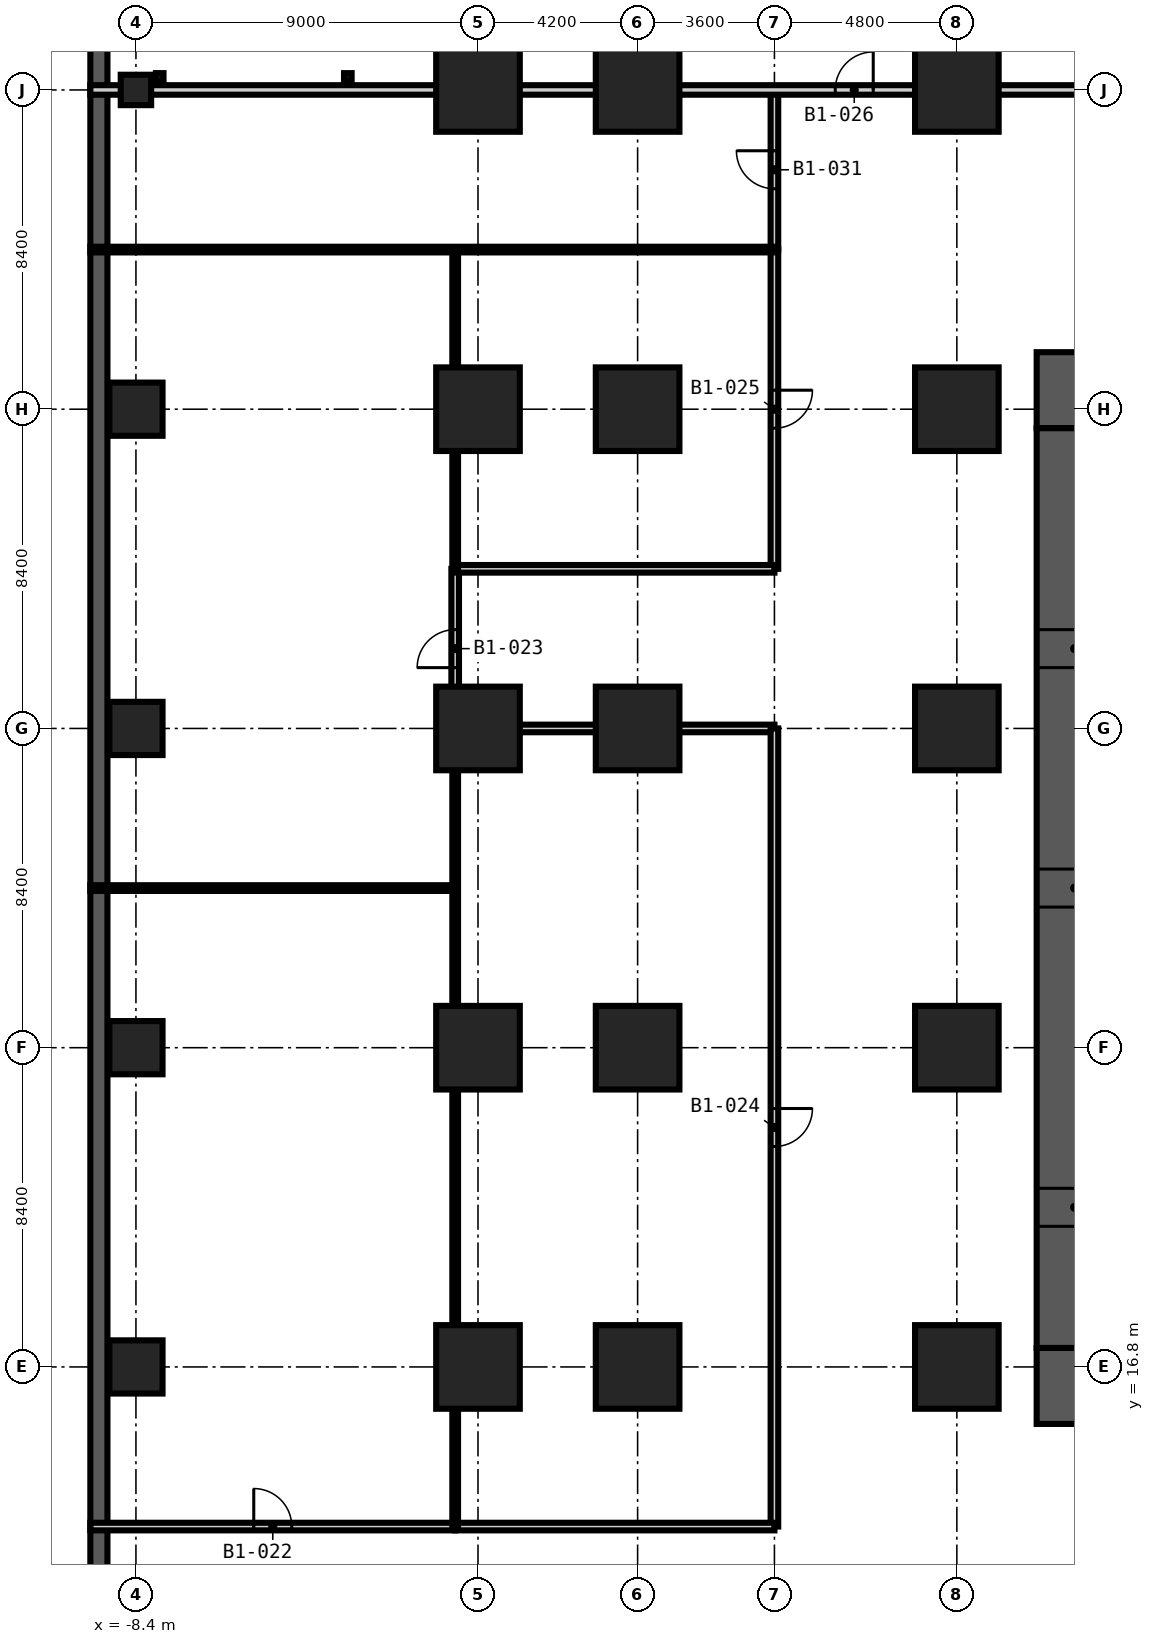
"""IFC4 building model, lengths in metres.
Left out: names, types, materials, properties, quantities, classifications, styles, units other than length and angle.
Written with IfcOpenShell. Run it as: python <this file> out.ifc"""

import sys

from ifc_helpers import new_model, si_unit, direction, frame, frame_2d, origin, origin_2d, place, context, subcontext, project, spatial, rectangle, hollow_rectangle, extrude, element, fill, save


model = new_model("IFC4")
c1 = context("Model", 3, precision=1e-05, world=origin(), true_north=direction((0.0, 1.0)))
c2 = subcontext(c1, "Body", "Model", "MODEL_VIEW")
j1 = project(units=[si_unit("LENGTHUNIT", "METRE"), si_unit("PLANEANGLEUNIT", "RADIAN")], contexts=[c1])
p1 = place(None, origin())
s1 = spatial("IfcSite", under=j1, at=p1, CompositionType="ELEMENT")
p2 = place(p1, origin())
s2 = spatial("IfcBuilding", under=s1, at=p2, CompositionType="ELEMENT")
p3 = place(p2, frame((0.0, 0.0, -5.4)))
s3 = spatial("IfcBuildingStorey", under=s2, at=p3, CompositionType="ELEMENT", Elevation=-5.4)
for number, where, z_axis, x_axis in (
    (1, (0.6, 16.8, 0.0), (0.0, 0.0, 1.0), (1.0, 0.0, 0.0)),
    (2, (0.6, 25.2, 0.0), (0.0, 0.0, 1.0), (1.0, 0.0, 0.0)),
    (3, (0.6, 33.6, 0.0), (0.0, 0.0, 1.0), (1.0, 0.0, 0.0)),
    (4, (0.6, 42.0, 0.0), (0.0, 0.0, 1.0), (1.0, 0.0, 0.0)),
    (5, (0.6, 50.4, 0.0), (0.0, 0.0, 1.0), (1.0, 0.0, 0.0)),
    (6, (4.8, 16.8, 0.0), (0.0, 0.0, 1.0), (1.0, 0.0, 0.0)),
    (7, (4.8, 25.2, 0.0), (0.0, 0.0, 1.0), (1.0, 0.0, 0.0)),
    (8, (4.8, 33.6, 0.0), (0.0, 0.0, 1.0), (1.0, 0.0, 0.0)),
    (9, (4.8, 42.0, 0.0), (0.0, 0.0, 1.0), (1.0, 0.0, 0.0)),
    (10, (4.8, 50.4, 0.0), (0.0, 0.0, 1.0), (1.0, 0.0, 0.0)),
    (11, (13.2, 16.8, 0.0), (0.0, 0.0, 1.0), (1.0, 0.0, 0.0)),
    (12, (13.2, 25.2, 0.0), (0.0, 0.0, 1.0), (1.0, 0.0, 0.0)),
    (13, (13.2, 33.6, 0.0), (0.0, 0.0, 1.0), (1.0, 0.0, 0.0)),
    (14, (13.2, 42.0, 0.0), (0.0, 0.0, 1.0), (1.0, 0.0, 0.0)),
    (15, (13.2, 50.4, 0.0), (0.0, 0.0, 1.0), (1.0, 0.0, 0.0)),
):
    element("IfcColumn", number, at=place(p3, frame(where, z_axis=z_axis, x_axis=x_axis)), inside=s3, PredefinedType="COLUMN", context=c2, shape_type="SweptSolid", body=[
        extrude(rectangle(XDim=2.2, YDim=2.2, at=origin_2d()), origin(), (0.0, 0.0, 1.0), 5.1),
    ])
for number, where, z_axis, x_axis in (
    (16, (-8.4, 16.8, -0.3), (0.0, 0.0, 1.0), (1.0, 0.0, 0.0)),
    (17, (-8.4, 25.2, -0.3), (0.0, 0.0, 1.0), (1.0, 0.0, 0.0)),
    (18, (-8.4, 33.6, -0.3), (0.0, 0.0, 1.0), (1.0, 0.0, 0.0)),
    (19, (-8.4, 42.0, -0.3), (0.0, 0.0, 1.0), (1.0, 0.0, 0.0)),
):
    element("IfcColumn", number, at=place(p3, frame(where, z_axis=z_axis, x_axis=x_axis)), inside=s3, PredefinedType="COLUMN", context=c2, shape_type="SweptSolid", body=[
        extrude(rectangle(XDim=1.4, YDim=1.4, at=origin_2d()), origin(), (0.0, 0.0, 1.0), 5.4),
    ])
p4 = place(p3, frame((-8.4, 50.4, -0.3), z_axis=(0.0, 0.0, 1.0), x_axis=(1.0, 0.0, 0.0)))
e20 = element("IfcColumn", 20, at=p4, inside=s3, PredefinedType="COLUMN", context=c2, shape_type="SweptSolid", body=[
    extrude(rectangle(XDim=0.8, YDim=0.8, at=origin_2d()), origin(), (0.0, 0.0, 1.0), 5.4),
])
p5 = place(p3, frame((15.3, 16.3, 0.0), z_axis=(0.0, 0.0, 1.0), x_axis=(1.0, 0.0, 0.0)))
e21 = element("IfcWall", 21, at=p5, inside=s3, PredefinedType="SHEAR", context=c2, shape_type="SweptSolid", body=[
    extrude(rectangle(XDim=28.2, YDim=2.0, at=frame_2d((14.1, 0.0))), origin(), (0.0, 0.0, 1.0), 5.1),
])
p6 = place(p5, frame((13.6, 0.0, 0.0)))
e22 = element("IfcOpeningElement", 22, at=p6, cuts=e21, PredefinedType="OPENING", context=c2, shape_type="SweptSolid", body=[
    extrude(rectangle(XDim=1.0, YDim=2.1, at=frame_2d((0.5, 1.05))), frame((0.0, 1.01, 0.0), z_axis=(0.0, -1.0, 0.0), x_axis=(1.0, 0.0, 0.0)), (0.0, 0.0, 1.0), 2.02),
])
p7 = place(p5, frame((19.9, 0.0, 0.0)))
e23 = element("IfcOpeningElement", 23, at=p7, cuts=e21, PredefinedType="OPENING", context=c2, shape_type="SweptSolid", body=[
    extrude(rectangle(XDim=1.0, YDim=2.1, at=frame_2d((0.5, 1.05))), frame((0.0, 1.01, 0.0), z_axis=(0.0, -1.0, 0.0), x_axis=(1.0, 0.0, 0.0)), (0.0, 0.0, 1.0), 2.02),
])
p8 = place(p3, frame((43.5, 42.5, 0.0), z_axis=(0.0, 0.0, 1.0), x_axis=(-1.0, 0.0, 0.0)))
e24 = element("IfcWall", 24, at=p8, inside=s3, PredefinedType="SHEAR", context=c2, shape_type="SweptSolid", body=[
    extrude(rectangle(XDim=28.2, YDim=2.0, at=frame_2d((14.1, 0.0))), origin(), (0.0, 0.0, 1.0), 5.1),
])
p9 = place(p8, frame((22.0, 0.0, 0.0)))
e25 = element("IfcOpeningElement", 25, at=p9, cuts=e24, PredefinedType="OPENING", context=c2, shape_type="SweptSolid", body=[
    extrude(rectangle(XDim=1.0, YDim=2.1, at=frame_2d((0.5, 1.05))), frame((0.0, 1.01, 0.0), z_axis=(0.0, -1.0, 0.0), x_axis=(1.0, 0.0, 0.0)), (0.0, 0.0, 1.0), 2.02),
])
p10 = place(p8, frame((11.4, 0.0, 0.0)))
e26 = element("IfcOpeningElement", 26, at=p10, cuts=e24, PredefinedType="OPENING", context=c2, shape_type="SweptSolid", body=[
    extrude(rectangle(XDim=1.2, YDim=2.2, at=frame_2d((0.6, 1.1))), frame((0.0, 1.01, 0.0), z_axis=(0.0, -1.0, 0.0), x_axis=(1.0, 0.0, 0.0)), (0.0, 0.0, 1.0), 2.02),
])
p11 = place(p3, frame((16.3, 41.5, 0.0), z_axis=(0.0, 0.0, 1.0), x_axis=(0.0, -1.0, 0.0)))
e27 = element("IfcWall", 27, at=p11, inside=s3, PredefinedType="SHEAR", context=c2, shape_type="SweptSolid", body=[
    extrude(rectangle(XDim=24.2, YDim=2.0, at=frame_2d((12.1, 0.0))), origin(), (0.0, 0.0, 1.0), 5.1),
])
p12 = place(p11, frame((11.6, 0.0, 0.0)))
e28 = element("IfcOpeningElement", 28, at=p12, cuts=e27, PredefinedType="OPENING", context=c2, shape_type="SweptSolid", body=[
    extrude(rectangle(XDim=1.0, YDim=2.1, at=frame_2d((0.5, 1.05))), frame((0.0, 1.01, 0.0), z_axis=(0.0, -1.0, 0.0), x_axis=(1.0, 0.0, 0.0)), (0.0, 0.0, 1.0), 2.02),
])
p13 = place(p11, frame((20.0, 0.0, 0.0)))
e29 = element("IfcOpeningElement", 29, at=p13, cuts=e27, PredefinedType="OPENING", context=c2, shape_type="SweptSolid", body=[
    extrude(rectangle(XDim=1.0, YDim=2.1, at=frame_2d((0.5, 1.05))), frame((0.0, 1.01, 0.0), z_axis=(0.0, -1.0, 0.0), x_axis=(1.0, 0.0, 0.0)), (0.0, 0.0, 1.0), 2.02),
])
p14 = place(p11, frame((5.3, 0.0, 0.0)))
e30 = element("IfcOpeningElement", 30, at=p14, cuts=e27, PredefinedType="OPENING", context=c2, shape_type="SweptSolid", body=[
    extrude(rectangle(XDim=1.0, YDim=2.1, at=frame_2d((0.5, 1.05))), frame((0.0, 1.01, 0.0), z_axis=(0.0, -1.0, 0.0), x_axis=(1.0, 0.0, 0.0)), (0.0, 0.0, 1.0), 2.02),
])
p15 = place(p3, frame((-9.375, 58.8, 0.0), z_axis=(0.0, 0.0, 1.0), x_axis=(0.0, -1.0, 0.0)))
e31 = element("IfcWall", 31, at=p15, inside=s3, PredefinedType="SOLIDWALL", context=c2, shape_type="SweptSolid", body=[
    extrude(rectangle(XDim=67.2, YDim=0.45, at=frame_2d((33.6, 0.0))), origin(), (0.0, 0.0, 1.0), 5.1),
])
p16 = place(p3, frame((0.0, 33.6, 0.0), z_axis=(0.0, 0.0, 1.0), x_axis=(0.0, 1.0, 0.0)))
e32 = element("IfcWall", 32, at=p16, inside=s3, PredefinedType="PARTITIONING", context=c2, shape_type="SweptSolid", body=[
    extrude(rectangle(XDim=4.2, YDim=0.2, at=frame_2d((2.1, 0.0))), origin(), (0.0, 0.0, 1.0), 5.1),
])
p17 = place(p16, frame((1.6, 0.0, 0.0)))
e33 = element("IfcOpeningElement", 33, at=p17, cuts=e32, PredefinedType="OPENING", context=c2, shape_type="SweptSolid", body=[
    extrude(rectangle(XDim=1.0, YDim=2.1, at=frame_2d((0.5, 1.05))), frame((0.0, 0.11, 0.0), z_axis=(0.0, -1.0, 0.0), x_axis=(1.0, 0.0, 0.0)), (0.0, 0.0, 1.0), 0.22),
])
p18 = place(p3, frame((8.4, 46.2, 0.0), z_axis=(0.0, 0.0, 1.0), x_axis=(0.0, 1.0, 0.0)))
e34 = element("IfcWall", 34, at=p18, inside=s3, PredefinedType="PARTITIONING", context=c2, shape_type="SweptSolid", body=[
    extrude(rectangle(XDim=4.2, YDim=0.2, at=frame_2d((2.1, 0.0))), origin(), (0.0, 0.0, 1.0), 5.1),
])
p19 = place(p18, frame((1.6, 0.0, 0.0)))
e35 = element("IfcOpeningElement", 35, at=p19, cuts=e34, PredefinedType="OPENING", context=c2, shape_type="SweptSolid", body=[
    extrude(rectangle(XDim=1.0, YDim=2.1, at=frame_2d((0.5, 1.05))), frame((0.0, 0.11, 0.0), z_axis=(0.0, -1.0, 0.0), x_axis=(1.0, 0.0, 0.0)), (0.0, 0.0, 1.0), 0.22),
])
p20 = place(p3, frame((-9.6, 12.6, 0.0), z_axis=(0.0, 0.0, 1.0), x_axis=(1.0, 0.0, 0.0)))
e36 = element("IfcWall", 36, at=p20, inside=s3, PredefinedType="PARTITIONING", context=c2, shape_type="SweptSolid", body=[
    extrude(rectangle(XDim=9.6, YDim=0.2, at=frame_2d((4.8, 0.0))), origin(), (0.0, 0.0, 1.0), 5.1),
])
p21 = place(p20, frame((4.3, 0.0, 0.0)))
e37 = element("IfcOpeningElement", 37, at=p21, cuts=e36, PredefinedType="OPENING", context=c2, shape_type="SweptSolid", body=[
    extrude(rectangle(XDim=1.0, YDim=2.1, at=frame_2d((0.5, 1.05))), frame((0.0, 0.11, 0.0), z_axis=(0.0, -1.0, 0.0), x_axis=(1.0, 0.0, 0.0)), (0.0, 0.0, 1.0), 0.22),
])
p22 = place(p3, frame((0.0, 33.6, 0.0), z_axis=(0.0, 0.0, 1.0), x_axis=(1.0, 0.0, 0.0)))
e38 = element("IfcWall", 38, at=p22, inside=s3, PredefinedType="PARTITIONING", context=c2, shape_type="SweptSolid", body=[
    extrude(rectangle(XDim=8.4, YDim=0.2, at=frame_2d((4.2, 0.0))), origin(), (0.0, 0.0, 1.0), 5.1),
])
p23 = place(p3, frame((8.4, 33.6, 0.0), z_axis=(0.0, 0.0, 1.0), x_axis=(0.0, -1.0, 0.0)))
e39 = element("IfcWall", 39, at=p23, inside=s3, PredefinedType="PARTITIONING", context=c2, shape_type="SweptSolid", body=[
    extrude(rectangle(XDim=21.0, YDim=0.2, at=frame_2d((10.5, 0.0))), origin(), (0.0, 0.0, 1.0), 5.1),
])
p24 = place(p23, frame((10.0, 0.0, 0.0)))
e40 = element("IfcOpeningElement", 40, at=p24, cuts=e39, PredefinedType="OPENING", context=c2, shape_type="SweptSolid", body=[
    extrude(rectangle(XDim=1.0, YDim=2.1, at=frame_2d((0.5, 1.05))), frame((0.0, 0.11, 0.0), z_axis=(0.0, -1.0, 0.0), x_axis=(1.0, 0.0, 0.0)), (0.0, 0.0, 1.0), 0.22),
])
p25 = place(p3, frame((8.4, 46.2, 0.0), z_axis=(0.0, 0.0, 1.0), x_axis=(0.0, -1.0, 0.0)))
e41 = element("IfcWall", 41, at=p25, inside=s3, PredefinedType="PARTITIONING", context=c2, shape_type="SweptSolid", body=[
    extrude(rectangle(XDim=8.4, YDim=0.2, at=frame_2d((4.2, 0.0))), origin(), (0.0, 0.0, 1.0), 5.1),
])
p26 = place(p25, frame((3.7, 0.0, 0.0)))
e42 = element("IfcOpeningElement", 42, at=p26, cuts=e41, PredefinedType="OPENING", context=c2, shape_type="SweptSolid", body=[
    extrude(rectangle(XDim=1.0, YDim=2.1, at=frame_2d((0.5, 1.05))), frame((0.0, 0.11, 0.0), z_axis=(0.0, -1.0, 0.0), x_axis=(1.0, 0.0, 0.0)), (0.0, 0.0, 1.0), 0.22),
])
for number, where, z_axis, x_axis in (
    (43, (8.4, 12.6, 0.0), (0.0, 0.0, 1.0), (-1.0, 0.0, 0.0)),
    (44, (8.4, 37.8, 0.0), (0.0, 0.0, 1.0), (-1.0, 0.0, 0.0)),
):
    element("IfcWall", number, at=place(p3, frame(where, z_axis=z_axis, x_axis=x_axis)), inside=s3, PredefinedType="PARTITIONING", context=c2, shape_type="SweptSolid", body=[
        extrude(rectangle(XDim=8.4, YDim=0.2, at=frame_2d((4.2, 0.0))), origin(), (0.0, 0.0, 1.0), 5.1),
    ])
p27 = place(p3, frame((12.6, 50.4, 0.0), z_axis=(0.0, 0.0, 1.0), x_axis=(0.0, 1.0, 0.0)))
e45 = element("IfcWall", 45, at=p27, inside=s3, PredefinedType="PARTITIONING", context=c2, shape_type="SweptSolid", body=[
    extrude(rectangle(XDim=8.4, YDim=0.25, at=frame_2d((4.2, 0.0))), origin(), (0.0, 0.0, 1.0), 5.1),
])
p28 = place(p3, frame((-9.6, 50.4, 0.0), z_axis=(0.0, 0.0, 1.0), x_axis=(1.0, 0.0, 0.0)))
e46 = element("IfcWall", 46, at=p28, inside=s3, PredefinedType="PARTITIONING", context=c2, shape_type="SweptSolid", body=[
    extrude(rectangle(XDim=68.4, YDim=0.25, at=frame_2d((34.2, 0.0))), origin(), (0.0, 0.0, 1.0), 5.1),
])
p29 = place(p28, frame((19.6, 0.0, 0.0)))
e47 = element("IfcOpeningElement", 47, at=p29, cuts=e46, PredefinedType="OPENING", context=c2, shape_type="SweptSolid", body=[
    extrude(rectangle(XDim=1.0, YDim=2.1, at=frame_2d((0.5, 1.05))), frame((0.0, 0.135, 0.0), z_axis=(0.0, -1.0, 0.0), x_axis=(1.0, 0.0, 0.0)), (0.0, 0.0, 1.0), 0.27),
])
p30 = place(p28, frame((32.8, 0.0, 0.0)))
e48 = element("IfcOpeningElement", 48, at=p30, cuts=e46, PredefinedType="OPENING", context=c2, shape_type="SweptSolid", body=[
    extrude(rectangle(XDim=1.0, YDim=2.1, at=frame_2d((0.5, 1.05))), frame((0.0, 0.135, 0.0), z_axis=(0.0, -1.0, 0.0), x_axis=(1.0, 0.0, 0.0)), (0.0, 0.0, 1.0), 0.27),
])
p31 = place(p28, frame((55.3, 0.0, 0.0)))
e49 = element("IfcOpeningElement", 49, at=p31, cuts=e46, PredefinedType="OPENING", context=c2, shape_type="SweptSolid", body=[
    extrude(rectangle(XDim=1.0, YDim=2.1, at=frame_2d((0.5, 1.05))), frame((0.0, 0.135, 0.0), z_axis=(0.0, -1.0, 0.0), x_axis=(1.0, 0.0, 0.0)), (0.0, 0.0, 1.0), 0.27),
])
p32 = place(p3, frame((0.0, 12.6, 0.0), z_axis=(0.0, 0.0, 1.0), x_axis=(0.0, 1.0, 0.0)))
e50 = element("IfcWall", 50, at=p32, inside=s3, PredefinedType="PARTITIONING", context=c2, shape_type="SweptSolid", body=[
    extrude(rectangle(XDim=21.0, YDim=0.15, at=frame_2d((10.5, 0.0))), origin(), (0.0, 0.0, 1.0), 5.1),
])
p33 = place(p3, frame((0.0, 37.8, 0.0), z_axis=(0.0, 0.0, 1.0), x_axis=(0.0, 1.0, 0.0)))
e51 = element("IfcWall", 51, at=p33, inside=s3, PredefinedType="PARTITIONING", context=c2, shape_type="SweptSolid", body=[
    extrude(rectangle(XDim=8.4, YDim=0.15, at=frame_2d((4.2, 0.0))), origin(), (0.0, 0.0, 1.0), 5.1),
])
p34 = place(p3, frame((-9.6, 29.4, 0.0), z_axis=(0.0, 0.0, 1.0), x_axis=(1.0, 0.0, 0.0)))
e52 = element("IfcWall", 52, at=p34, inside=s3, PredefinedType="PARTITIONING", context=c2, shape_type="SweptSolid", body=[
    extrude(rectangle(XDim=9.6, YDim=0.15, at=frame_2d((4.8, 0.0))), origin(), (0.0, 0.0, 1.0), 5.1),
])
p35 = place(p3, frame((-9.6, 46.2, 0.0), z_axis=(0.0, 0.0, 1.0), x_axis=(1.0, 0.0, 0.0)))
e53 = element("IfcWall", 53, at=p35, inside=s3, PredefinedType="PARTITIONING", context=c2, shape_type="SweptSolid", body=[
    extrude(rectangle(XDim=18.0, YDim=0.15, at=frame_2d((9.0, 0.0))), origin(), (0.0, 0.0, 1.0), 5.1),
])
for number, where, z_axis, x_axis in (
    (54, (-7.775, 50.742, 0.0), (0.0, 0.0, 1.0), (1.0, 0.0, 0.0)),
    (55, (-2.825, 50.742, 0.0), (0.0, 0.0, 1.0), (1.0, 0.0, 0.0)),
):
    element("IfcColumn", number, at=place(p3, frame(where, z_axis=z_axis, x_axis=x_axis)), inside=s3, PredefinedType="COLUMN", context=c2, shape_type="SweptSolid", body=[
        extrude(hollow_rectangle(XDim=0.2, YDim=0.2, WallThickness=0.01, at=origin_2d()), origin(), (0.0, 0.0, 1.0), 5.1),
    ])
p36 = place(p12, origin())
e56 = element("IfcDoor", 56, at=p36, inside=s3, OperationType="SINGLE_SWING_RIGHT", PredefinedType="DOOR", context=c2, shape_type="SweptSolid", body=[
    extrude(rectangle(XDim=1.0, YDim=2.1, at=frame_2d((0.5, 1.05))), frame((0.0, 0.025, 0.0), z_axis=(0.0, -1.0, 0.0), x_axis=(1.0, 0.0, 0.0)), (0.0, 0.0, 1.0), 0.05),
])
fill(e28, e56)
p37 = place(p13, origin())
e57 = element("IfcDoor", 57, at=p37, inside=s3, OperationType="SINGLE_SWING_LEFT", PredefinedType="DOOR", context=c2, shape_type="SweptSolid", body=[
    extrude(rectangle(XDim=1.0, YDim=2.1, at=frame_2d((0.5, 1.05))), frame((0.0, 0.025, 0.0), z_axis=(0.0, -1.0, 0.0), x_axis=(1.0, 0.0, 0.0)), (0.0, 0.0, 1.0), 0.05),
])
fill(e29, e57)
p38 = place(p14, origin())
e58 = element("IfcDoor", 58, at=p38, inside=s3, OperationType="SINGLE_SWING_RIGHT", PredefinedType="DOOR", context=c2, shape_type="SweptSolid", body=[
    extrude(rectangle(XDim=1.0, YDim=2.1, at=frame_2d((0.5, 1.05))), frame((0.0, 0.025, 0.0), z_axis=(0.0, -1.0, 0.0), x_axis=(1.0, 0.0, 0.0)), (0.0, 0.0, 1.0), 0.05),
])
fill(e30, e58)
p39 = place(p21, origin())
e59 = element("IfcDoor", 59, at=p39, inside=s3, OperationType="SINGLE_SWING_LEFT", PredefinedType="DOOR", context=c2, shape_type="SweptSolid", body=[
    extrude(rectangle(XDim=1.0, YDim=2.1, at=frame_2d((0.5, 1.05))), frame((0.0, 0.025, 0.0), z_axis=(0.0, -1.0, 0.0), x_axis=(1.0, 0.0, 0.0)), (0.0, 0.0, 1.0), 0.05),
])
fill(e37, e59)
p40 = place(p17, origin())
e60 = element("IfcDoor", 60, at=p40, inside=s3, OperationType="SINGLE_SWING_LEFT", PredefinedType="DOOR", context=c2, shape_type="SweptSolid", body=[
    extrude(rectangle(XDim=1.0, YDim=2.1, at=frame_2d((0.5, 1.05))), frame((0.0, 0.025, 0.0), z_axis=(0.0, -1.0, 0.0), x_axis=(1.0, 0.0, 0.0)), (0.0, 0.0, 1.0), 0.05),
])
fill(e33, e60)
p41 = place(p24, origin())
e61 = element("IfcDoor", 61, at=p41, inside=s3, OperationType="SINGLE_SWING_LEFT", PredefinedType="DOOR", context=c2, shape_type="SweptSolid", body=[
    extrude(rectangle(XDim=1.0, YDim=2.1, at=frame_2d((0.5, 1.05))), frame((0.0, 0.025, 0.0), z_axis=(0.0, -1.0, 0.0), x_axis=(1.0, 0.0, 0.0)), (0.0, 0.0, 1.0), 0.05),
])
fill(e40, e61)
p42 = place(p26, origin())
e62 = element("IfcDoor", 62, at=p42, inside=s3, OperationType="SINGLE_SWING_LEFT", PredefinedType="DOOR", context=c2, shape_type="SweptSolid", body=[
    extrude(rectangle(XDim=1.0, YDim=2.1, at=frame_2d((0.5, 1.05))), frame((0.0, 0.025, 0.0), z_axis=(0.0, -1.0, 0.0), x_axis=(1.0, 0.0, 0.0)), (0.0, 0.0, 1.0), 0.05),
])
fill(e42, e62)
p43 = place(p29, origin())
e63 = element("IfcDoor", 63, at=p43, inside=s3, OperationType="SINGLE_SWING_RIGHT", PredefinedType="DOOR", context=c2, shape_type="SweptSolid", body=[
    extrude(rectangle(XDim=1.0, YDim=2.1, at=frame_2d((0.5, 1.05))), frame((0.0, 0.025, 0.0), z_axis=(0.0, -1.0, 0.0), x_axis=(1.0, 0.0, 0.0)), (0.0, 0.0, 1.0), 0.05),
])
fill(e47, e63)
p44 = place(p19, origin())
e64 = element("IfcDoor", 64, at=p44, inside=s3, OperationType="SINGLE_SWING_RIGHT", PredefinedType="DOOR", context=c2, shape_type="SweptSolid", body=[
    extrude(rectangle(XDim=1.0, YDim=2.1, at=frame_2d((0.5, 1.05))), frame((0.0, 0.025, 0.0), z_axis=(0.0, -1.0, 0.0), x_axis=(1.0, 0.0, 0.0)), (0.0, 0.0, 1.0), 0.05),
])
fill(e35, e64)
save(model, sys.argv[1])
